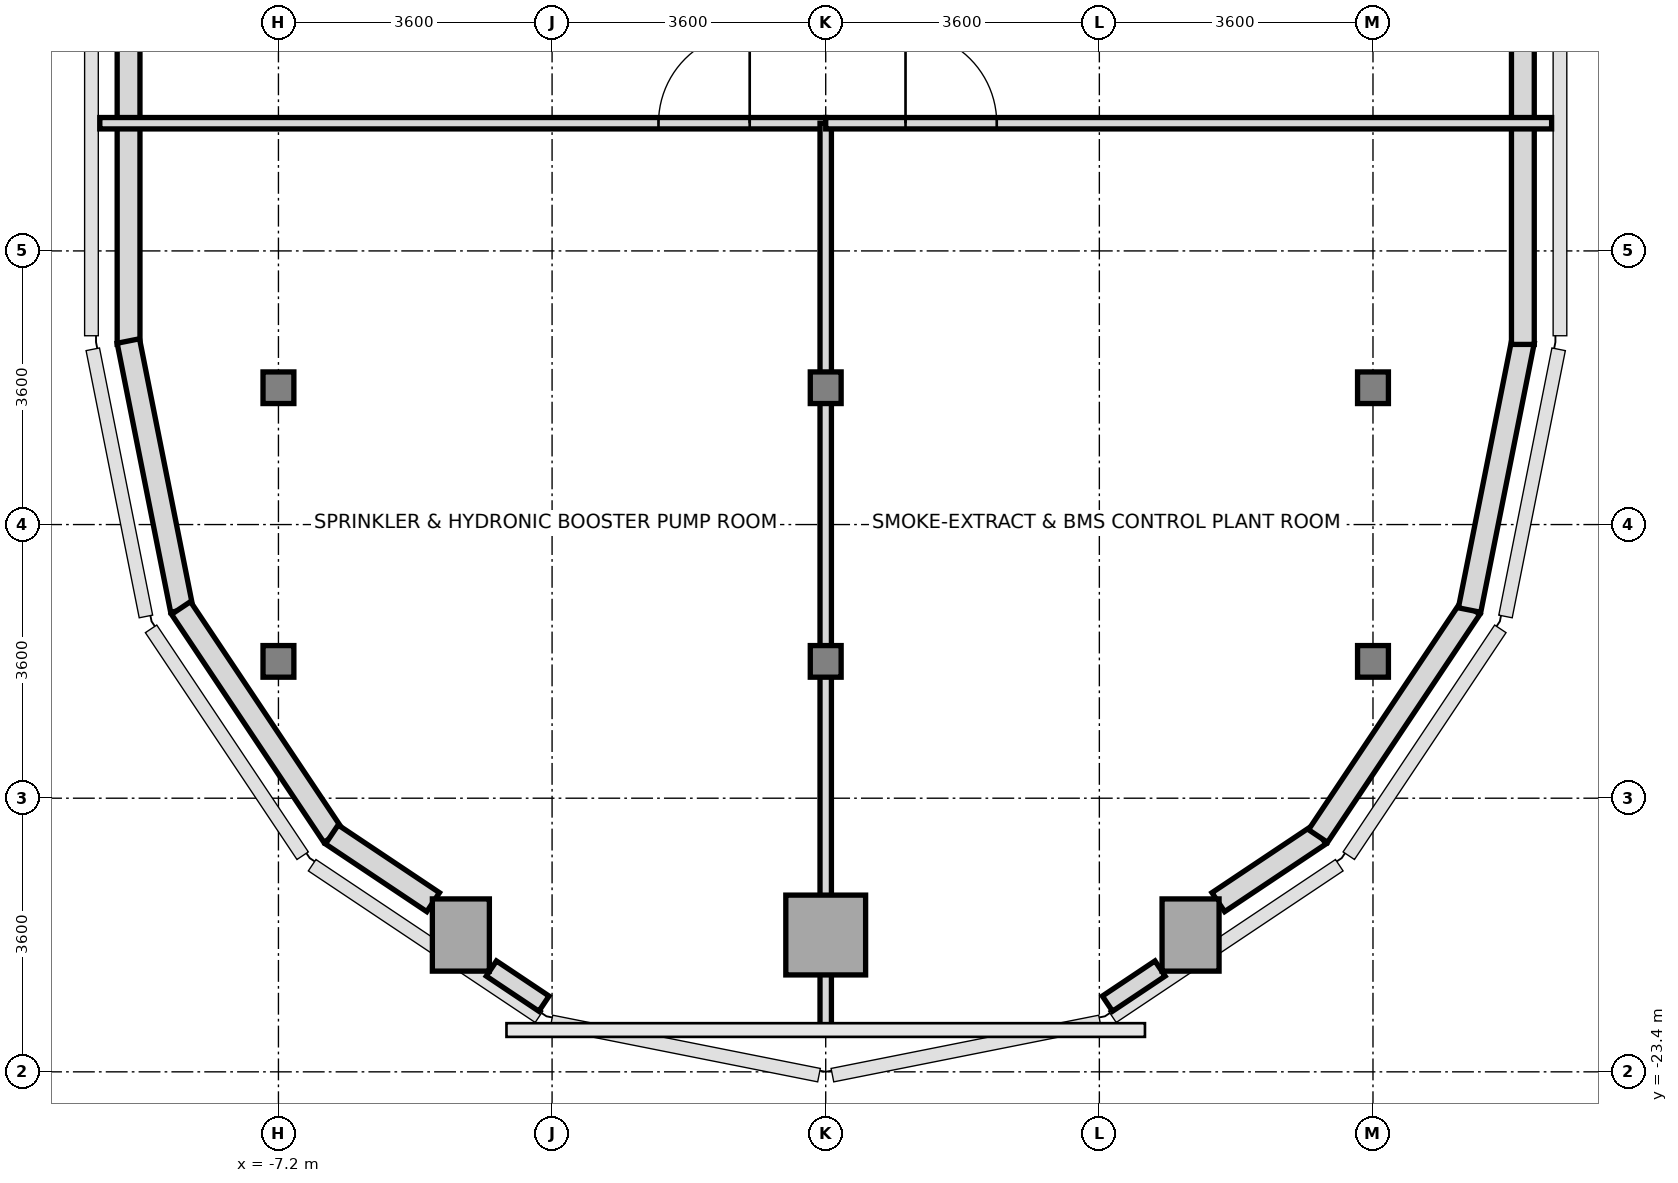
"""IFC4 building model, lengths in metres.
Left out: names, types, materials, properties, quantities, classifications, styles, units other than length and angle.
Written with IfcOpenShell. Run it as: python <this file> out.ifc"""

import sys

from ifc_helpers import new_model, si_unit, direction, frame, frame_2d, origin, origin_2d, place, context, subcontext, project, spatial, rectangle, i_section, extrude, source, transform, mapped, element, fill, save


model = new_model("IFC4")
c1 = context("Model", 3, precision=1e-05, world=origin(), true_north=direction((0.0, 1.0)))
c2 = subcontext(c1, "Body", "Model", "MODEL_VIEW")
j1 = project(units=[si_unit("LENGTHUNIT", "METRE"), si_unit("PLANEANGLEUNIT", "RADIAN")], contexts=[c1])
p1 = place(None, origin())
s1 = spatial("IfcSite", under=j1, at=p1, CompositionType="ELEMENT")
p2 = place(p1, origin())
s2 = spatial("IfcBuilding", under=s1, at=p2, CompositionType="ELEMENT")
p3 = place(p2, frame((0.0, 0.0, 25.2)))
s3 = spatial("IfcBuildingStorey", under=s2, at=p3, CompositionType="ELEMENT", Elevation=25.2)
m1 = source(origin(), c2, "Body", "SweptSolid", [
    extrude(i_section(OverallWidth=0.406, OverallDepth=0.416, WebThickness=0.024, FlangeThickness=0.039, at=origin_2d()), origin(), (0.0, 0.0, 1.0), 5.2),
])
for number, where, z_axis, x_axis in (
    (1, (-7.2, -18.0, 0.0), (0.0, 0.0, 1.0), (1.0, 0.0, 0.0)),
    (2, (-7.2, -14.4, 0.0), (0.0, 0.0, 1.0), (1.0, 0.0, 0.0)),
):
    element("IfcColumn", number, at=place(p3, frame(where, z_axis=z_axis, x_axis=x_axis)), inside=s3, PredefinedType="COLUMN", context=c2, shape_type="MappedRepresentation", body=[
        mapped(m1, transform((0.0, 0.0, 0.0), x_axis=(1.0, 0.0, 0.0), y_axis=(0.0, 1.0, 0.0), z_axis=(0.0, 0.0, 1.0), scale=1.0)),
    ])
m2 = source(origin(), c2, "Body", "SweptSolid", [
    extrude(rectangle(XDim=0.75, YDim=0.95, at=origin_2d()), origin(), (0.0, 0.0, 1.0), 5.2),
])
p4 = place(p3, frame((-4.8, -21.6, 0.0), z_axis=(0.0, 0.0, 1.0), x_axis=(1.0, 0.0, 0.0)))
e3 = element("IfcColumn", 3, at=p4, inside=s3, PredefinedType="COLUMN", context=c2, shape_type="MappedRepresentation", body=[
    mapped(m2, transform((0.0, 0.0, 0.0), x_axis=(1.0, 0.0, 0.0), y_axis=(0.0, 1.0, 0.0), z_axis=(0.0, 0.0, 1.0), scale=1.0)),
])
m3 = source(origin(), c2, "Body", "SweptSolid", [
    extrude(rectangle(XDim=1.05, YDim=1.05, at=origin_2d()), origin(), (0.0, 0.0, 1.0), 5.2),
])
p5 = place(p3, frame((0.0, -21.6, 0.0), z_axis=(0.0, 0.0, 1.0), x_axis=(1.0, 0.0, 0.0)))
e4 = element("IfcColumn", 4, at=p5, inside=s3, PredefinedType="COLUMN", context=c2, shape_type="MappedRepresentation", body=[
    mapped(m3, transform((0.0, 0.0, 0.0), x_axis=(1.0, 0.0, 0.0), y_axis=(0.0, 1.0, 0.0), z_axis=(0.0, 0.0, 1.0), scale=1.0)),
])
for number, where, z_axis, x_axis in (
    (5, (0.0, -18.0, 0.0), (0.0, 0.0, 1.0), (1.0, 0.0, 0.0)),
    (6, (0.0, -14.4, 0.0), (0.0, 0.0, 1.0), (1.0, 0.0, 0.0)),
):
    element("IfcColumn", number, at=place(p3, frame(where, z_axis=z_axis, x_axis=x_axis)), inside=s3, PredefinedType="COLUMN", context=c2, shape_type="MappedRepresentation", body=[
        mapped(m1, transform((0.0, 0.0, 0.0), x_axis=(1.0, 0.0, 0.0), y_axis=(0.0, 1.0, 0.0), z_axis=(0.0, 0.0, 1.0), scale=1.0)),
    ])
p6 = place(p3, frame((4.8, -21.6, 0.0), z_axis=(0.0, 0.0, 1.0), x_axis=(1.0, 0.0, 0.0)))
e7 = element("IfcColumn", 7, at=p6, inside=s3, PredefinedType="COLUMN", context=c2, shape_type="MappedRepresentation", body=[
    mapped(m2, transform((0.0, 0.0, 0.0), x_axis=(1.0, 0.0, 0.0), y_axis=(0.0, 1.0, 0.0), z_axis=(0.0, 0.0, 1.0), scale=1.0)),
])
for number, where, z_axis, x_axis in (
    (8, (7.2, -18.0, 0.0), (0.0, 0.0, 1.0), (1.0, 0.0, 0.0)),
    (9, (7.2, -14.4, 0.0), (0.0, 0.0, 1.0), (1.0, 0.0, 0.0)),
):
    element("IfcColumn", number, at=place(p3, frame(where, z_axis=z_axis, x_axis=x_axis)), inside=s3, PredefinedType="COLUMN", context=c2, shape_type="MappedRepresentation", body=[
        mapped(m1, transform((0.0, 0.0, 0.0), x_axis=(1.0, 0.0, 0.0), y_axis=(0.0, 1.0, 0.0), z_axis=(0.0, 0.0, 1.0), scale=1.0)),
    ])
p7 = place(p3, frame((-9.172, -9.66, 0.0), z_axis=(0.0, 0.0, 1.0), x_axis=(0.0, -1.0, 0.0)))
e10 = element("IfcWall", 10, at=p7, inside=s3, PredefinedType="SOLIDWALL", context=c2, shape_type="SweptSolid", body=[
    extrude(rectangle(XDim=4.17, YDim=0.3, at=frame_2d((2.085, 0.0))), origin(), (0.0, 0.0, 1.0), 5.2),
])
p8 = place(p3, frame((-9.175, -13.785, 0.0), z_axis=(0.0, 0.0, 1.0), x_axis=(0.195114232679, -0.980780523974, 0.0)))
e11 = element("IfcWall", 11, at=p8, inside=s3, PredefinedType="SOLIDWALL", context=c2, shape_type="SweptSolid", body=[
    extrude(rectangle(XDim=3.609, YDim=0.3, at=frame_2d((1.804, 0.0))), origin(), (0.0, 0.0, 1.0), 5.2),
])
p9 = place(p3, frame((-8.482, -17.297, 0.0), z_axis=(0.0, 0.0, 1.0), x_axis=(0.555574187116, -0.831466970246, 0.0)))
e12 = element("IfcWall", 12, at=p9, inside=s3, PredefinedType="SOLIDWALL", context=c2, shape_type="SweptSolid", body=[
    extrude(rectangle(XDim=3.609, YDim=0.3, at=frame_2d((1.804, 0.0))), origin(), (0.0, 0.0, 1.0), 4.386),
])
for number, where, z_axis, x_axis in (
    (13, (-6.498, -20.277, 0.0), (0.0, 0.0, 1.0), (0.831, -0.556, 0.0)),
    (14, (5.165, -21.168, 0.0), (0.0, 0.0, 1.0), (0.831, 0.556, 0.0)),
):
    element("IfcWall", number, at=place(p3, frame(where, z_axis=z_axis, x_axis=x_axis)), inside=s3, PredefinedType="SOLIDWALL", context=c2, shape_type="SweptSolid", body=[
        extrude(rectangle(XDim=1.603, YDim=0.3, at=frame_2d((0.802, 0.0))), origin(), (0.0, 0.0, 1.0), 5.2),
    ])
p10 = place(p3, frame((6.477, -20.298, 0.0), z_axis=(0.0, 0.0, 1.0), x_axis=(0.555574187116, 0.831466970246, 0.0)))
e15 = element("IfcWall", 15, at=p10, inside=s3, PredefinedType="SOLIDWALL", context=c2, shape_type="SweptSolid", body=[
    extrude(rectangle(XDim=3.609, YDim=0.3, at=frame_2d((1.804, 0.0))), origin(), (0.0, 0.0, 1.0), 4.386),
])
p11 = place(p3, frame((8.471, -17.325, 0.0), z_axis=(0.0, 0.0, 1.0), x_axis=(0.195114232679, 0.980780523974, 0.0)))
e16 = element("IfcWall", 16, at=p11, inside=s3, PredefinedType="SOLIDWALL", context=c2, shape_type="SweptSolid", body=[
    extrude(rectangle(XDim=3.609, YDim=0.3, at=frame_2d((1.804, 0.0))), origin(), (0.0, 0.0, 1.0), 5.2),
])
p12 = place(p3, frame((9.172, -13.83, 0.0), z_axis=(0.0, 0.0, 1.0), x_axis=(0.0, 1.0, 0.0)))
e17 = element("IfcWall", 17, at=p12, inside=s3, PredefinedType="SOLIDWALL", context=c2, shape_type="SweptSolid", body=[
    extrude(rectangle(XDim=4.17, YDim=0.3, at=frame_2d((2.085, 0.0))), origin(), (0.0, 0.0, 1.0), 5.2),
])
for number, where, z_axis, x_axis in (
    (18, (4.398, -22.041, 0.0), (0.0, 0.0, 1.0), (-0.832, -0.555, 0.0)),
    (19, (-3.707, -22.503, 0.0), (0.0, 0.0, 1.0), (-0.832, 0.555, 0.0)),
):
    element("IfcWall", number, at=place(p3, frame(where, z_axis=z_axis, x_axis=x_axis)), inside=s3, PredefinedType="PARAPET", context=c2, shape_type="SweptSolid", body=[
        extrude(rectangle(XDim=0.832, YDim=0.24, at=frame_2d((0.416, 0.0))), origin(), (0.0, 0.0, 1.0), 1.15),
    ])
p13 = place(p3, frame((-9.55, -10.92, 0.0), z_axis=(0.0, 0.0, 1.0), x_axis=(1.0, 0.0, 0.0)))
e20 = element("IfcWall", 20, at=p13, inside=s3, PredefinedType="PARTITIONING", context=c2, shape_type="SweptSolid", body=[
    extrude(rectangle(XDim=9.55, YDim=0.15, at=frame_2d((4.775, 0.0))), origin(), (0.0, 0.0, 1.0), 5.2),
])
p14 = place(p13, frame((7.35, 0.0, 0.0)))
e21 = element("IfcOpeningElement", 21, at=p14, cuts=e20, PredefinedType="OPENING", context=c2, shape_type="SweptSolid", body=[
    extrude(rectangle(XDim=1.2, YDim=2.2, at=frame_2d((0.6, 1.1))), frame((0.0, 0.085, 0.0), z_axis=(0.0, -1.0, 0.0), x_axis=(1.0, 0.0, 0.0)), (0.0, 0.0, 1.0), 0.17),
])
p15 = place(p3, frame((0.0, -22.85, 0.0), z_axis=(0.0, 0.0, 1.0), x_axis=(0.0, 1.0, 0.0)))
e22 = element("IfcWall", 22, at=p15, inside=s3, PredefinedType="PARTITIONING", context=c2, shape_type="SweptSolid", body=[
    extrude(rectangle(XDim=11.93, YDim=0.15, at=frame_2d((5.965, 0.0))), origin(), (0.0, 0.0, 1.0), 4.386),
])
p16 = place(p3, frame((0.0, -10.92, 0.0), z_axis=(0.0, 0.0, 1.0), x_axis=(1.0, 0.0, 0.0)))
e23 = element("IfcWall", 23, at=p16, inside=s3, PredefinedType="PARTITIONING", context=c2, shape_type="SweptSolid", body=[
    extrude(rectangle(XDim=9.55, YDim=0.15, at=frame_2d((4.775, 0.0))), origin(), (0.0, 0.0, 1.0), 5.2),
])
p17 = place(p16, frame((1.05, 0.0, 0.0)))
e24 = element("IfcOpeningElement", 24, at=p17, cuts=e23, PredefinedType="OPENING", context=c2, shape_type="SweptSolid", body=[
    extrude(rectangle(XDim=1.2, YDim=2.2, at=frame_2d((0.6, 1.1))), frame((0.0, 0.085, 0.0), z_axis=(0.0, -1.0, 0.0), x_axis=(1.0, 0.0, 0.0)), (0.0, 0.0, 1.0), 0.17),
])
m4 = source(origin(), c2, "Body", "SweptSolid", [
    extrude(rectangle(XDim=1.2, YDim=2.2, at=frame_2d((0.6, 1.1))), frame((0.0, 0.025, 0.0), z_axis=(0.0, -1.0, 0.0), x_axis=(1.0, 0.0, 0.0)), (0.0, 0.0, 1.0), 0.05),
])
p18 = place(p14, origin())
e25 = element("IfcDoor", 25, at=p18, inside=s3, OperationType="SINGLE_SWING_RIGHT", PredefinedType="DOOR", context=c2, shape_type="MappedRepresentation", body=[
    mapped(m4, transform((0.0, 0.0, 0.0), x_axis=(1.0, 0.0, 0.0), y_axis=(0.0, 1.0, 0.0), z_axis=(0.0, 0.0, 1.0), scale=1.0)),
])
fill(e21, e25)
p19 = place(p17, origin())
e26 = element("IfcDoor", 26, at=p19, inside=s3, OperationType="SINGLE_SWING_LEFT", PredefinedType="DOOR", context=c2, shape_type="MappedRepresentation", body=[
    mapped(m4, transform((0.0, 0.0, 0.0), x_axis=(1.0, 0.0, 0.0), y_axis=(0.0, 1.0, 0.0), z_axis=(0.0, 0.0, 1.0), scale=1.0)),
])
fill(e24, e26)
save(model, sys.argv[1])
